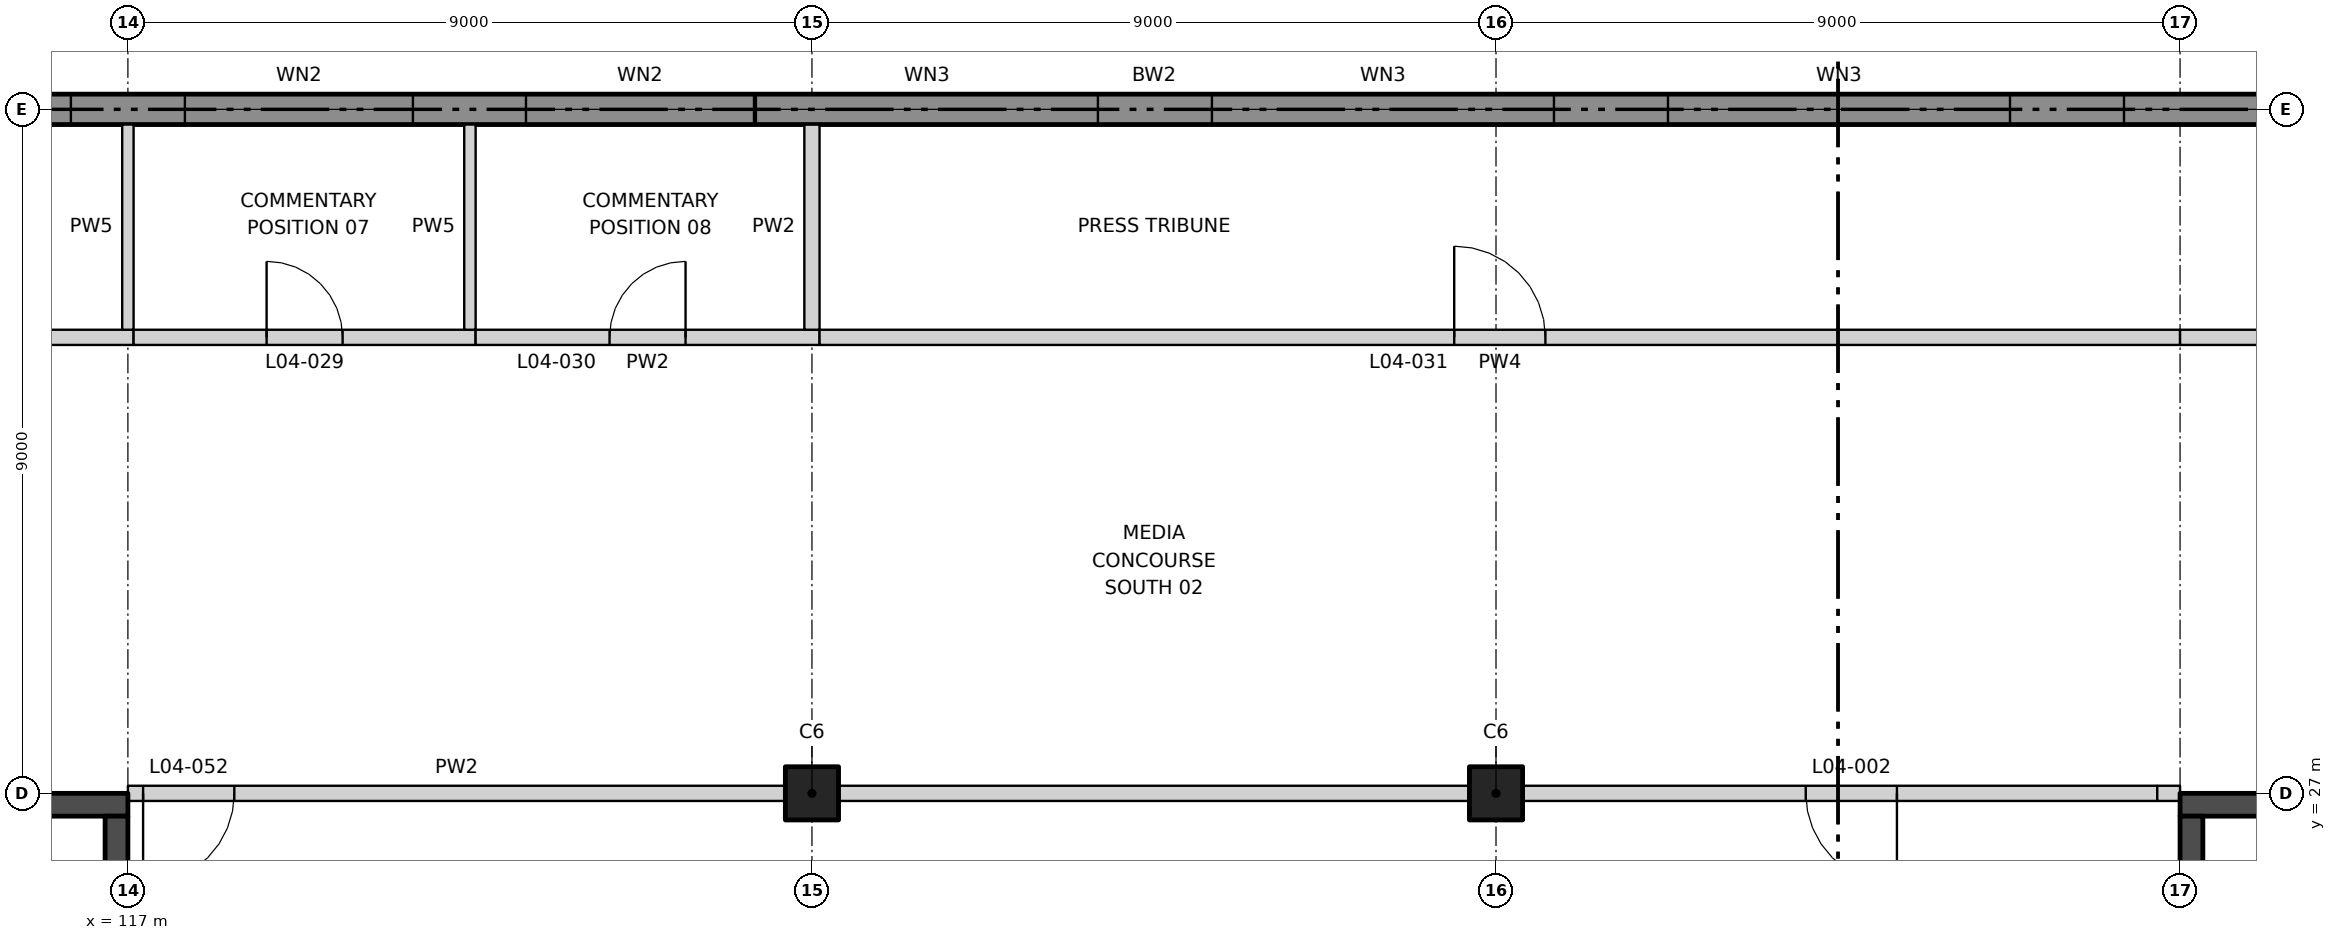
"""IFC4 building model, lengths in metres.
Left out: names, types, materials, properties, quantities, classifications, styles, units other than length and angle.
Written with IfcOpenShell. Run it as: python <this file> out.ifc"""

import sys

from ifc_helpers import new_model, si_unit, direction, frame, frame_2d, origin, origin_2d, place, context, subcontext, project, spatial, rectangle, extrude, element, fill, save


model = new_model("IFC4")
c1 = context("Model", 3, precision=1e-05, world=origin(), true_north=direction((0.0, 1.0)))
c2 = subcontext(c1, "Body", "Model", "MODEL_VIEW")
j1 = project(units=[si_unit("LENGTHUNIT", "METRE"), si_unit("PLANEANGLEUNIT", "RADIAN")], contexts=[c1])
p1 = place(None, origin())
s1 = spatial("IfcSite", under=j1, at=p1, CompositionType="ELEMENT")
p2 = place(p1, origin())
s2 = spatial("IfcBuilding", under=s1, at=p2, CompositionType="ELEMENT")
p3 = place(p2, frame((0.0, 0.0, 28.0)))
s3 = spatial("IfcBuildingStorey", under=s2, at=p3, CompositionType="ELEMENT", Elevation=28.0)
for number, where, z_axis, x_axis in (
    (1, (126.0, 27.0, 0.0), (0.0, 0.0, 1.0), (1.0, 0.0, 0.0)),
    (2, (135.0, 27.0, 0.0), (0.0, 0.0, 1.0), (1.0, 0.0, 0.0)),
):
    element("IfcColumn", number, at=place(p3, frame(where, z_axis=z_axis, x_axis=x_axis)), inside=s3, PredefinedType="COLUMN", context=c2, shape_type="SweptSolid", body=[
        extrude(rectangle(XDim=0.7, YDim=0.7, at=origin_2d()), origin(), (0.0, 0.0, 1.0), 5.5),
    ])
p4 = place(p3, frame((90.0, 36.0, 0.0), z_axis=(0.0, 0.0, 1.0), x_axis=(1.0, 0.0, 0.0)))
e3 = element("IfcWall", 3, at=p4, inside=s3, PredefinedType="SOLIDWALL", context=c2, shape_type="SweptSolid", body=[
    extrude(rectangle(XDim=81.0, YDim=0.4, at=frame_2d((40.5, 0.0))), origin(), (0.0, 0.0, 1.0), 5.5),
])
p5 = place(p4, frame((1.962, 0.0, 0.9)))
e4 = element("IfcOpeningElement", 4, at=p5, cuts=e3, PredefinedType="OPENING", context=c2, shape_type="SweptSolid", body=[
    extrude(rectangle(XDim=3.0, YDim=1.8, at=frame_2d((1.5, 0.9))), frame((0.0, 0.21, 0.0), z_axis=(0.0, -1.0, 0.0), x_axis=(1.0, 0.0, 0.0)), (0.0, 0.0, 1.0), 0.42),
])
p6 = place(p4, frame((5.25, 0.0, 0.9)))
e5 = element("IfcOpeningElement", 5, at=p6, cuts=e3, PredefinedType="OPENING", context=c2, shape_type="SweptSolid", body=[
    extrude(rectangle(XDim=3.0, YDim=1.8, at=frame_2d((1.5, 0.9))), frame((0.0, 0.21, 0.0), z_axis=(0.0, -1.0, 0.0), x_axis=(1.0, 0.0, 0.0)), (0.0, 0.0, 1.0), 0.42),
])
p7 = place(p4, frame((9.75, 0.0, 0.9)))
e6 = element("IfcOpeningElement", 6, at=p7, cuts=e3, PredefinedType="OPENING", context=c2, shape_type="SweptSolid", body=[
    extrude(rectangle(XDim=3.0, YDim=1.8, at=frame_2d((1.5, 0.9))), frame((0.0, 0.21, 0.0), z_axis=(0.0, -1.0, 0.0), x_axis=(1.0, 0.0, 0.0)), (0.0, 0.0, 1.0), 0.42),
])
p8 = place(p4, frame((14.25, 0.0, 0.9)))
e7 = element("IfcOpeningElement", 7, at=p8, cuts=e3, PredefinedType="OPENING", context=c2, shape_type="SweptSolid", body=[
    extrude(rectangle(XDim=3.0, YDim=1.8, at=frame_2d((1.5, 0.9))), frame((0.0, 0.21, 0.0), z_axis=(0.0, -1.0, 0.0), x_axis=(1.0, 0.0, 0.0)), (0.0, 0.0, 1.0), 0.42),
])
p9 = place(p4, frame((18.75, 0.0, 0.9)))
e8 = element("IfcOpeningElement", 8, at=p9, cuts=e3, PredefinedType="OPENING", context=c2, shape_type="SweptSolid", body=[
    extrude(rectangle(XDim=3.0, YDim=1.8, at=frame_2d((1.5, 0.9))), frame((0.0, 0.21, 0.0), z_axis=(0.0, -1.0, 0.0), x_axis=(1.0, 0.0, 0.0)), (0.0, 0.0, 1.0), 0.42),
])
p10 = place(p4, frame((23.25, 0.0, 0.9)))
e9 = element("IfcOpeningElement", 9, at=p10, cuts=e3, PredefinedType="OPENING", context=c2, shape_type="SweptSolid", body=[
    extrude(rectangle(XDim=3.0, YDim=1.8, at=frame_2d((1.5, 0.9))), frame((0.0, 0.21, 0.0), z_axis=(0.0, -1.0, 0.0), x_axis=(1.0, 0.0, 0.0)), (0.0, 0.0, 1.0), 0.42),
])
p11 = place(p4, frame((27.75, 0.0, 0.9)))
e10 = element("IfcOpeningElement", 10, at=p11, cuts=e3, PredefinedType="OPENING", context=c2, shape_type="SweptSolid", body=[
    extrude(rectangle(XDim=3.0, YDim=1.8, at=frame_2d((1.5, 0.9))), frame((0.0, 0.21, 0.0), z_axis=(0.0, -1.0, 0.0), x_axis=(1.0, 0.0, 0.0)), (0.0, 0.0, 1.0), 0.42),
])
p12 = place(p4, frame((32.238, 0.0, 0.9)))
e11 = element("IfcOpeningElement", 11, at=p12, cuts=e3, PredefinedType="OPENING", context=c2, shape_type="SweptSolid", body=[
    extrude(rectangle(XDim=3.0, YDim=1.8, at=frame_2d((1.5, 0.9))), frame((0.0, 0.21, 0.0), z_axis=(0.0, -1.0, 0.0), x_axis=(1.0, 0.0, 0.0)), (0.0, 0.0, 1.0), 0.42),
])
p13 = place(p4, frame((35.262, 0.0, 0.9)))
e12 = element("IfcOpeningElement", 12, at=p13, cuts=e3, PredefinedType="OPENING", context=c2, shape_type="SweptSolid", body=[
    extrude(rectangle(XDim=4.5, YDim=1.8, at=frame_2d((2.25, 0.9))), frame((0.0, 0.21, 0.0), z_axis=(0.0, -1.0, 0.0), x_axis=(1.0, 0.0, 0.0)), (0.0, 0.0, 1.0), 0.42),
])
p14 = place(p4, frame((41.262, 0.0, 0.9)))
e13 = element("IfcOpeningElement", 13, at=p14, cuts=e3, PredefinedType="OPENING", context=c2, shape_type="SweptSolid", body=[
    extrude(rectangle(XDim=4.5, YDim=1.8, at=frame_2d((2.25, 0.9))), frame((0.0, 0.21, 0.0), z_axis=(0.0, -1.0, 0.0), x_axis=(1.0, 0.0, 0.0)), (0.0, 0.0, 1.0), 0.42),
])
p15 = place(p4, frame((47.262, 0.0, 0.9)))
e14 = element("IfcOpeningElement", 14, at=p15, cuts=e3, PredefinedType="OPENING", context=c2, shape_type="SweptSolid", body=[
    extrude(rectangle(XDim=4.5, YDim=1.8, at=frame_2d((2.25, 0.9))), frame((0.0, 0.21, 0.0), z_axis=(0.0, -1.0, 0.0), x_axis=(1.0, 0.0, 0.0)), (0.0, 0.0, 1.0), 0.42),
])
p16 = place(p4, frame((53.262, 0.0, 0.9)))
e15 = element("IfcOpeningElement", 15, at=p16, cuts=e3, PredefinedType="OPENING", context=c2, shape_type="SweptSolid", body=[
    extrude(rectangle(XDim=4.5, YDim=1.8, at=frame_2d((2.25, 0.9))), frame((0.0, 0.21, 0.0), z_axis=(0.0, -1.0, 0.0), x_axis=(1.0, 0.0, 0.0)), (0.0, 0.0, 1.0), 0.42),
])
p17 = place(p4, frame((59.262, 0.0, 0.9)))
e16 = element("IfcOpeningElement", 16, at=p17, cuts=e3, PredefinedType="OPENING", context=c2, shape_type="SweptSolid", body=[
    extrude(rectangle(XDim=4.5, YDim=1.8, at=frame_2d((2.25, 0.9))), frame((0.0, 0.21, 0.0), z_axis=(0.0, -1.0, 0.0), x_axis=(1.0, 0.0, 0.0)), (0.0, 0.0, 1.0), 0.42),
])
p18 = place(p4, frame((75.9, 0.0, 0.0)))
e17 = element("IfcOpeningElement", 17, at=p18, cuts=e3, PredefinedType="OPENING", context=c2, shape_type="SweptSolid", body=[
    extrude(rectangle(XDim=1.2, YDim=2.1, at=frame_2d((0.6, 1.05))), frame((0.0, 0.21, 0.0), z_axis=(0.0, -1.0, 0.0), x_axis=(1.0, 0.0, 0.0)), (0.0, 0.0, 1.0), 0.42),
])
p19 = place(p4, frame((0.6, 0.0, 0.0)))
e18 = element("IfcOpeningElement", 18, at=p19, cuts=e3, PredefinedType="OPENING", context=c2, shape_type="SweptSolid", body=[
    extrude(rectangle(XDim=1.2, YDim=2.1, at=frame_2d((0.6, 1.05))), frame((0.0, 0.21, 0.0), z_axis=(0.0, -1.0, 0.0), x_axis=(1.0, 0.0, 0.0)), (0.0, 0.0, 1.0), 0.42),
])
p20 = place(p3, frame((135.35, 27.0, 0.0), z_axis=(0.0, 0.0, 1.0), x_axis=(1.0, 0.0, 0.0)))
e19 = element("IfcWall", 19, at=p20, inside=s3, PredefinedType="PARTITIONING", context=c2, shape_type="SweptSolid", body=[
    extrude(rectangle(XDim=8.35, YDim=0.2, at=frame_2d((4.175, 0.0))), origin(), (0.0, 0.0, 1.0), 4.2),
])
p21 = place(p20, frame((3.725, 0.0, 0.0)))
e20 = element("IfcOpeningElement", 20, at=p21, cuts=e19, PredefinedType="OPENING", context=c2, shape_type="SweptSolid", body=[
    extrude(rectangle(XDim=1.2, YDim=2.1, at=frame_2d((0.6, 1.05))), frame((0.0, 0.11, 0.0), z_axis=(0.0, -1.0, 0.0), x_axis=(1.0, 0.0, 0.0)), (0.0, 0.0, 1.0), 0.22),
])
p22 = place(p3, frame((126.35, 27.0, 0.0), z_axis=(0.0, 0.0, 1.0), x_axis=(1.0, 0.0, 0.0)))
e21 = element("IfcWall", 21, at=p22, inside=s3, PredefinedType="PARTITIONING", context=c2, shape_type="SweptSolid", body=[
    extrude(rectangle(XDim=8.3, YDim=0.2, at=frame_2d((4.15, 0.0))), origin(), (0.0, 0.0, 1.0), 4.2),
])
p23 = place(p3, frame((117.0, 27.0, 0.0), z_axis=(0.0, 0.0, 1.0), x_axis=(1.0, 0.0, 0.0)))
e22 = element("IfcWall", 22, at=p23, inside=s3, PredefinedType="PARTITIONING", context=c2, shape_type="SweptSolid", body=[
    extrude(rectangle(XDim=8.65, YDim=0.2, at=frame_2d((4.325, 0.0))), origin(), (0.0, 0.0, 1.0), 4.2),
])
p24 = place(p23, frame((0.2, 0.0, 0.0)))
e23 = element("IfcOpeningElement", 23, at=p24, cuts=e22, PredefinedType="OPENING", context=c2, shape_type="SweptSolid", body=[
    extrude(rectangle(XDim=1.2, YDim=2.1, at=frame_2d((0.6, 1.05))), frame((0.0, 0.11, 0.0), z_axis=(0.0, -1.0, 0.0), x_axis=(1.0, 0.0, 0.0)), (0.0, 0.0, 1.0), 0.22),
])
p25 = place(p3, frame((112.575, 33.0, 0.0), z_axis=(0.0, 0.0, 1.0), x_axis=(1.0, 0.0, 0.0)))
e24 = element("IfcWall", 24, at=p25, inside=s3, PredefinedType="PARTITIONING", context=c2, shape_type="SweptSolid", body=[
    extrude(rectangle(XDim=4.5, YDim=0.2, at=frame_2d((2.25, 0.0))), origin(), (0.0, 0.0, 1.0), 5.5),
])
p26 = place(p25, frame((1.75, 0.0, 0.0)))
e25 = element("IfcOpeningElement", 25, at=p26, cuts=e24, PredefinedType="OPENING", context=c2, shape_type="SweptSolid", body=[
    extrude(rectangle(XDim=1.0, YDim=2.1, at=frame_2d((0.5, 1.05))), frame((0.0, 0.11, 0.0), z_axis=(0.0, -1.0, 0.0), x_axis=(1.0, 0.0, 0.0)), (0.0, 0.0, 1.0), 0.22),
])
p27 = place(p3, frame((117.075, 33.0, 0.0), z_axis=(0.0, 0.0, 1.0), x_axis=(1.0, 0.0, 0.0)))
e26 = element("IfcWall", 26, at=p27, inside=s3, PredefinedType="PARTITIONING", context=c2, shape_type="SweptSolid", body=[
    extrude(rectangle(XDim=4.5, YDim=0.2, at=frame_2d((2.25, 0.0))), origin(), (0.0, 0.0, 1.0), 5.5),
])
p28 = place(p27, frame((1.75, 0.0, 0.0)))
e27 = element("IfcOpeningElement", 27, at=p28, cuts=e26, PredefinedType="OPENING", context=c2, shape_type="SweptSolid", body=[
    extrude(rectangle(XDim=1.0, YDim=2.1, at=frame_2d((0.5, 1.05))), frame((0.0, 0.11, 0.0), z_axis=(0.0, -1.0, 0.0), x_axis=(1.0, 0.0, 0.0)), (0.0, 0.0, 1.0), 0.22),
])
p29 = place(p3, frame((121.575, 33.0, 0.0), z_axis=(0.0, 0.0, 1.0), x_axis=(1.0, 0.0, 0.0)))
e28 = element("IfcWall", 28, at=p29, inside=s3, PredefinedType="PARTITIONING", context=c2, shape_type="SweptSolid", body=[
    extrude(rectangle(XDim=4.525, YDim=0.2, at=frame_2d((2.263, 0.0))), origin(), (0.0, 0.0, 1.0), 5.5),
])
p30 = place(p29, frame((1.762, 0.0, 0.0)))
e29 = element("IfcOpeningElement", 29, at=p30, cuts=e28, PredefinedType="OPENING", context=c2, shape_type="SweptSolid", body=[
    extrude(rectangle(XDim=1.0, YDim=2.1, at=frame_2d((0.5, 1.05))), frame((0.0, 0.11, 0.0), z_axis=(0.0, -1.0, 0.0), x_axis=(1.0, 0.0, 0.0)), (0.0, 0.0, 1.0), 0.22),
])
p31 = place(p3, frame((126.1, 33.0, 0.0), z_axis=(0.0, 0.0, 1.0), x_axis=(1.0, 0.0, 0.0)))
e30 = element("IfcWall", 30, at=p31, inside=s3, PredefinedType="PARTITIONING", context=c2, shape_type="SweptSolid", body=[
    extrude(rectangle(XDim=17.9, YDim=0.2, at=frame_2d((8.95, 0.0))), origin(), (0.0, 0.0, 1.0), 5.5),
])
p32 = place(p31, frame((8.35, 0.0, 0.0)))
e31 = element("IfcOpeningElement", 31, at=p32, cuts=e30, PredefinedType="OPENING", context=c2, shape_type="SweptSolid", body=[
    extrude(rectangle(XDim=1.2, YDim=2.1, at=frame_2d((0.6, 1.05))), frame((0.0, 0.11, 0.0), z_axis=(0.0, -1.0, 0.0), x_axis=(1.0, 0.0, 0.0)), (0.0, 0.0, 1.0), 0.22),
])
p33 = place(p3, frame((144.0, 33.0, 0.0), z_axis=(0.0, 0.0, 1.0), x_axis=(1.0, 0.0, 0.0)))
e32 = element("IfcWall", 32, at=p33, inside=s3, PredefinedType="PARTITIONING", context=c2, shape_type="SweptSolid", body=[
    extrude(rectangle(XDim=9.075, YDim=0.2, at=frame_2d((4.538, 0.0))), origin(), (0.0, 0.0, 1.0), 5.5),
])
p34 = place(p3, frame((117.0, 33.1, 0.0), z_axis=(0.0, 0.0, 1.0), x_axis=(0.0, 1.0, 0.0)))
e33 = element("IfcWall", 33, at=p34, inside=s3, PredefinedType="PARTITIONING", context=c2, shape_type="SweptSolid", body=[
    extrude(rectangle(XDim=2.7, YDim=0.15, at=frame_2d((1.35, 0.0))), origin(), (0.0, 0.0, 1.0), 4.2),
])
p35 = place(p3, frame((121.5, 33.1, 0.0), z_axis=(0.0, 0.0, 1.0), x_axis=(0.0, 1.0, 0.0)))
e34 = element("IfcWall", 34, at=p35, inside=s3, PredefinedType="PARTITIONING", context=c2, shape_type="SweptSolid", body=[
    extrude(rectangle(XDim=2.7, YDim=0.15, at=frame_2d((1.35, 0.0))), origin(), (0.0, 0.0, 1.0), 5.5),
])
p36 = place(p3, frame((126.0, 33.1, 0.0), z_axis=(0.0, 0.0, 1.0), x_axis=(0.0, 1.0, 0.0)))
e35 = element("IfcWall", 35, at=p36, inside=s3, PredefinedType="PARTITIONING", context=c2, shape_type="SweptSolid", body=[
    extrude(rectangle(XDim=2.7, YDim=0.2, at=frame_2d((1.35, 0.0))), origin(), (0.0, 0.0, 1.0), 4.2),
])
p37 = place(p3, frame((117.0, 26.85, 0.0), z_axis=(0.0, 0.0, 1.0), x_axis=(-1.0, 0.0, 0.0)))
e36 = element("IfcWall", 36, at=p37, inside=s3, PredefinedType="SHEAR", context=c2, shape_type="SweptSolid", body=[
    extrude(rectangle(XDim=18.0, YDim=0.3, at=frame_2d((9.0, 0.0))), origin(), (0.0, 0.0, 1.0), 5.5),
])
p38 = place(p37, frame((1.5, 0.0, 0.0)))
e37 = element("IfcOpeningElement", 37, at=p38, cuts=e36, PredefinedType="OPENING", context=c2, shape_type="SweptSolid", body=[
    extrude(rectangle(XDim=1.2, YDim=2.1, at=frame_2d((0.6, 1.05))), frame((0.0, 0.16, 0.0), z_axis=(0.0, -1.0, 0.0), x_axis=(1.0, 0.0, 0.0)), (0.0, 0.0, 1.0), 0.32),
])
p39 = place(p3, frame((116.85, 26.7, 0.0), z_axis=(0.0, 0.0, 1.0), x_axis=(0.0, -1.0, 0.0)))
e38 = element("IfcWall", 38, at=p39, inside=s3, PredefinedType="SHEAR", context=c2, shape_type="SweptSolid", body=[
    extrude(rectangle(XDim=8.7, YDim=0.3, at=frame_2d((4.35, 0.0))), origin(), (0.0, 0.0, 1.0), 5.5),
])
p40 = place(p3, frame((144.0, 26.85, 0.0), z_axis=(0.0, 0.0, 1.0), x_axis=(1.0, 0.0, 0.0)))
e39 = element("IfcWall", 39, at=p40, inside=s3, PredefinedType="SHEAR", context=c2, shape_type="SweptSolid", body=[
    extrude(rectangle(XDim=18.0, YDim=0.3, at=frame_2d((9.0, 0.0))), origin(), (0.0, 0.0, 1.0), 5.5),
])
p41 = place(p40, frame((1.5, 0.0, 0.0)))
e40 = element("IfcOpeningElement", 40, at=p41, cuts=e39, PredefinedType="OPENING", context=c2, shape_type="SweptSolid", body=[
    extrude(rectangle(XDim=1.2, YDim=2.1, at=frame_2d((0.6, 1.05))), frame((0.0, 0.16, 0.0), z_axis=(0.0, -1.0, 0.0), x_axis=(1.0, 0.0, 0.0)), (0.0, 0.0, 1.0), 0.32),
])
p42 = place(p3, frame((144.15, 26.7, 0.0), z_axis=(0.0, 0.0, 1.0), x_axis=(0.0, -1.0, 0.0)))
e41 = element("IfcWall", 41, at=p42, inside=s3, PredefinedType="SHEAR", context=c2, shape_type="SweptSolid", body=[
    extrude(rectangle(XDim=8.7, YDim=0.3, at=frame_2d((4.35, 0.0))), origin(), (0.0, 0.0, 1.0), 5.5),
])
p43 = place(p3, frame((143.7, 27.0, 0.0), z_axis=(0.0, 0.0, 1.0), x_axis=(1.0, 0.0, 0.0)))
e42 = element("IfcWall", 42, at=p43, inside=s3, PredefinedType="PARTITIONING", context=c2, shape_type="SweptSolid", body=[
    extrude(rectangle(XDim=0.3, YDim=0.2, at=frame_2d((0.15, 0.0))), origin(), (0.0, 0.0, 1.0), 5.5),
])
p44 = place(p21, frame((1.2, 0.0, 0.0), z_axis=(0.0, 0.0, 1.0), x_axis=(-1.0, 0.0, 0.0)))
e43 = element("IfcDoor", 43, at=p44, inside=s3, OperationType="SINGLE_SWING_LEFT", PredefinedType="DOOR", context=c2, shape_type="SweptSolid", body=[
    extrude(rectangle(XDim=1.2, YDim=2.1, at=frame_2d((0.6, 1.05))), frame((0.0, 0.025, 0.0), z_axis=(0.0, -1.0, 0.0), x_axis=(1.0, 0.0, 0.0)), (0.0, 0.0, 1.0), 0.05),
])
fill(e20, e43)
p45 = place(p28, origin())
e44 = element("IfcDoor", 44, at=p45, inside=s3, OperationType="SINGLE_SWING_LEFT", PredefinedType="DOOR", context=c2, shape_type="SweptSolid", body=[
    extrude(rectangle(XDim=1.0, YDim=2.1, at=frame_2d((0.5, 1.05))), frame((0.0, 0.025, 0.0), z_axis=(0.0, -1.0, 0.0), x_axis=(1.0, 0.0, 0.0)), (0.0, 0.0, 1.0), 0.05),
])
fill(e27, e44)
p46 = place(p30, origin())
e45 = element("IfcDoor", 45, at=p46, inside=s3, OperationType="SINGLE_SWING_RIGHT", PredefinedType="DOOR", context=c2, shape_type="SweptSolid", body=[
    extrude(rectangle(XDim=1.0, YDim=2.1, at=frame_2d((0.5, 1.05))), frame((0.0, 0.025, 0.0), z_axis=(0.0, -1.0, 0.0), x_axis=(1.0, 0.0, 0.0)), (0.0, 0.0, 1.0), 0.05),
])
fill(e29, e45)
p47 = place(p32, origin())
e46 = element("IfcDoor", 46, at=p47, inside=s3, OperationType="SINGLE_SWING_LEFT", PredefinedType="DOOR", context=c2, shape_type="SweptSolid", body=[
    extrude(rectangle(XDim=1.2, YDim=2.1, at=frame_2d((0.6, 1.05))), frame((0.0, 0.025, 0.0), z_axis=(0.0, -1.0, 0.0), x_axis=(1.0, 0.0, 0.0)), (0.0, 0.0, 1.0), 0.05),
])
fill(e31, e46)
p48 = place(p24, frame((1.2, 0.0, 0.0), z_axis=(0.0, 0.0, 1.0), x_axis=(-1.0, 0.0, 0.0)))
e47 = element("IfcDoor", 47, at=p48, inside=s3, OperationType="SINGLE_SWING_RIGHT", PredefinedType="DOOR", context=c2, shape_type="SweptSolid", body=[
    extrude(rectangle(XDim=1.2, YDim=2.1, at=frame_2d((0.6, 1.05))), frame((0.0, 0.025, 0.0), z_axis=(0.0, -1.0, 0.0), x_axis=(1.0, 0.0, 0.0)), (0.0, 0.0, 1.0), 0.05),
])
fill(e23, e47)
p49 = place(p10, origin())
e48 = element("IfcWindow", 48, at=p49, inside=s3, PartitioningType="SINGLE_PANEL", PredefinedType="WINDOW", context=c2, shape_type="SweptSolid", body=[
    extrude(rectangle(XDim=3.0, YDim=1.8, at=frame_2d((1.5, 0.9))), frame((0.0, 0.03, 0.0), z_axis=(0.0, -1.0, 0.0), x_axis=(1.0, 0.0, 0.0)), (0.0, 0.0, 1.0), 0.06),
])
fill(e9, e48)
p50 = place(p11, origin())
e49 = element("IfcWindow", 49, at=p50, inside=s3, PartitioningType="SINGLE_PANEL", PredefinedType="WINDOW", context=c2, shape_type="SweptSolid", body=[
    extrude(rectangle(XDim=3.0, YDim=1.8, at=frame_2d((1.5, 0.9))), frame((0.0, 0.03, 0.0), z_axis=(0.0, -1.0, 0.0), x_axis=(1.0, 0.0, 0.0)), (0.0, 0.0, 1.0), 0.06),
])
fill(e10, e49)
p51 = place(p12, origin())
e50 = element("IfcWindow", 50, at=p51, inside=s3, PartitioningType="SINGLE_PANEL", PredefinedType="WINDOW", context=c2, shape_type="SweptSolid", body=[
    extrude(rectangle(XDim=3.0, YDim=1.8, at=frame_2d((1.5, 0.9))), frame((0.0, 0.03, 0.0), z_axis=(0.0, -1.0, 0.0), x_axis=(1.0, 0.0, 0.0)), (0.0, 0.0, 1.0), 0.06),
])
fill(e11, e50)
p52 = place(p13, origin())
e51 = element("IfcWindow", 51, at=p52, inside=s3, PartitioningType="SINGLE_PANEL", PredefinedType="WINDOW", context=c2, shape_type="SweptSolid", body=[
    extrude(rectangle(XDim=4.5, YDim=1.8, at=frame_2d((2.25, 0.9))), frame((0.0, 0.03, 0.0), z_axis=(0.0, -1.0, 0.0), x_axis=(1.0, 0.0, 0.0)), (0.0, 0.0, 1.0), 0.06),
])
fill(e12, e51)
p53 = place(p14, origin())
e52 = element("IfcWindow", 52, at=p53, inside=s3, PartitioningType="SINGLE_PANEL", PredefinedType="WINDOW", context=c2, shape_type="SweptSolid", body=[
    extrude(rectangle(XDim=4.5, YDim=1.8, at=frame_2d((2.25, 0.9))), frame((0.0, 0.03, 0.0), z_axis=(0.0, -1.0, 0.0), x_axis=(1.0, 0.0, 0.0)), (0.0, 0.0, 1.0), 0.06),
])
fill(e13, e52)
p54 = place(p15, origin())
e53 = element("IfcWindow", 53, at=p54, inside=s3, PartitioningType="SINGLE_PANEL", PredefinedType="WINDOW", context=c2, shape_type="SweptSolid", body=[
    extrude(rectangle(XDim=4.5, YDim=1.8, at=frame_2d((2.25, 0.9))), frame((0.0, 0.03, 0.0), z_axis=(0.0, -1.0, 0.0), x_axis=(1.0, 0.0, 0.0)), (0.0, 0.0, 1.0), 0.06),
])
fill(e14, e53)
p55 = place(p16, origin())
e54 = element("IfcWindow", 54, at=p55, inside=s3, PartitioningType="SINGLE_PANEL", PredefinedType="WINDOW", context=c2, shape_type="SweptSolid", body=[
    extrude(rectangle(XDim=4.5, YDim=1.8, at=frame_2d((2.25, 0.9))), frame((0.0, 0.03, 0.0), z_axis=(0.0, -1.0, 0.0), x_axis=(1.0, 0.0, 0.0)), (0.0, 0.0, 1.0), 0.06),
])
fill(e15, e54)
save(model, sys.argv[1])
